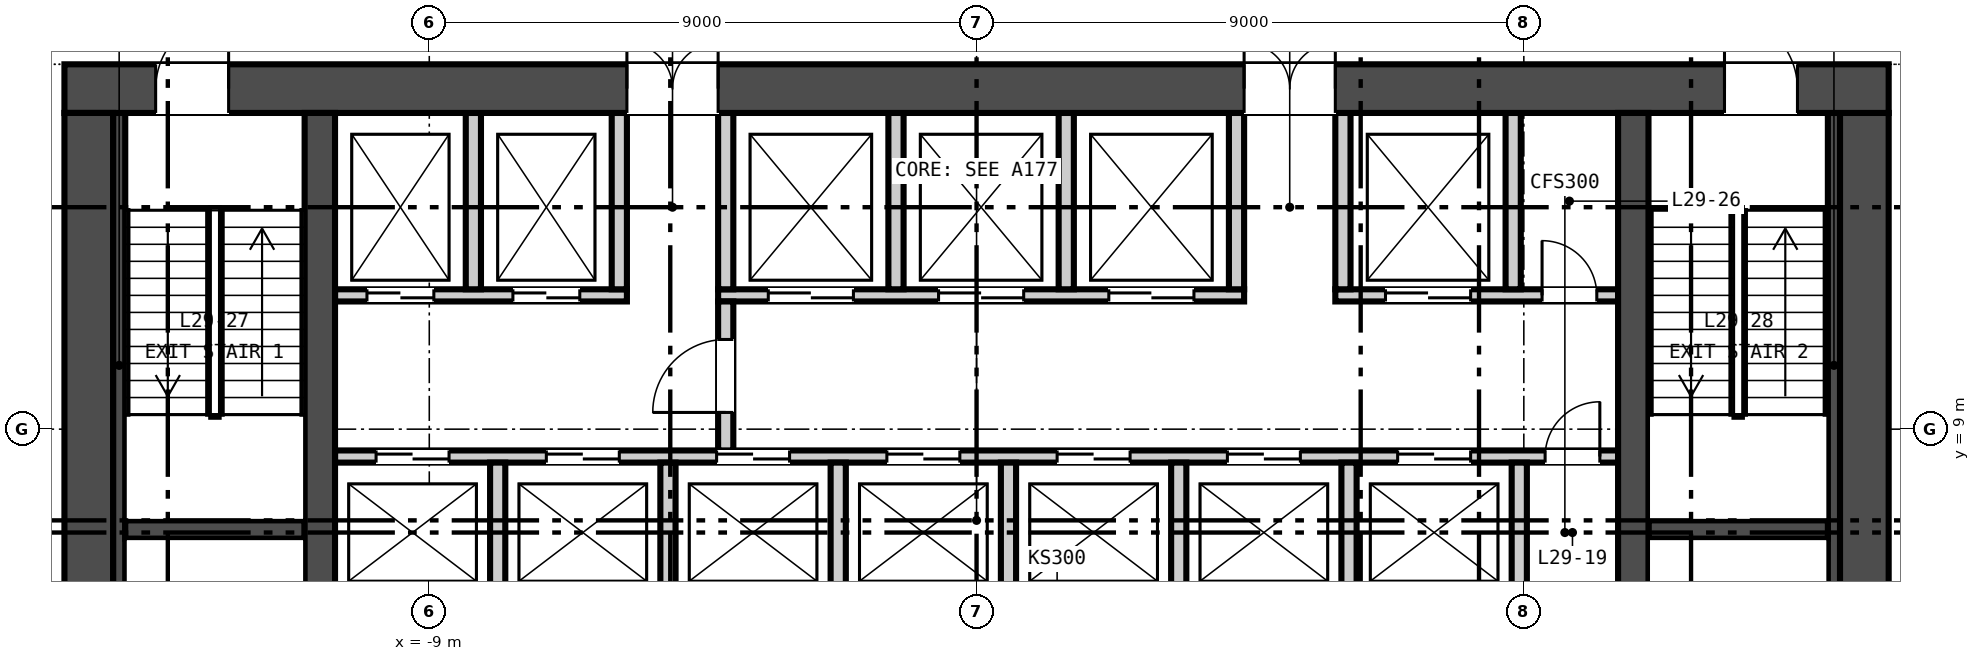
"""IFC4 building model, lengths in metres.
Left out: names, types, materials, properties, quantities, classifications, styles, units other than length and angle.
Written with IfcOpenShell. Run it as: python <this file> out.ifc"""

import sys

from ifc_helpers import new_model, si_unit, direction, frame, frame_2d, origin, place, context, subcontext, project, spatial, rectangle, extrude, element, fill, save


model = new_model("IFC4")
c1 = context("Model", 3, precision=1e-05, world=origin(), true_north=direction((0.0, 1.0)))
c2 = subcontext(c1, "Body", "Model", "MODEL_VIEW")
j1 = project(units=[si_unit("LENGTHUNIT", "METRE"), si_unit("PLANEANGLEUNIT", "RADIAN")], contexts=[c1])
p1 = place(None, origin())
s1 = spatial("IfcSite", under=j1, at=p1, CompositionType="ELEMENT")
p2 = place(p1, origin())
s2 = spatial("IfcBuilding", under=s1, at=p2, CompositionType="ELEMENT")
p3 = place(p2, frame((0.0, 0.0, 121.65)))
s3 = spatial("IfcBuildingStorey", under=s2, at=p3, CompositionType="ELEMENT", Elevation=121.65)
p4 = place(p3, frame((-15.0, 14.6, -0.3), z_axis=(0.0, 0.0, 1.0), x_axis=(1.0, 0.0, 0.0)))
e1 = element("IfcWall", 1, at=p4, inside=s3, PredefinedType="SOLIDWALL", context=c2, shape_type="SweptSolid", body=[
    extrude(rectangle(XDim=30.0, YDim=0.8, at=frame_2d((15.0, 0.0))), origin(), (0.0, 0.0, 1.0), 4.65),
])
p5 = place(p4, frame((9.25, 0.0, 0.3)))
e2 = element("IfcOpeningElement", 2, at=p5, cuts=e1, PredefinedType="OPENING", context=c2, shape_type="SweptSolid", body=[
    extrude(rectangle(XDim=1.5, YDim=2.1, at=frame_2d((0.75, 1.05))), frame((0.0, 0.41, 0.0), z_axis=(0.0, -1.0, 0.0), x_axis=(1.0, 0.0, 0.0)), (0.0, 0.0, 1.0), 0.82),
])
p6 = place(p4, frame((19.4, 0.0, 0.3)))
e3 = element("IfcOpeningElement", 3, at=p6, cuts=e1, PredefinedType="OPENING", context=c2, shape_type="SweptSolid", body=[
    extrude(rectangle(XDim=1.5, YDim=2.1, at=frame_2d((0.75, 1.05))), frame((0.0, 0.41, 0.0), z_axis=(0.0, -1.0, 0.0), x_axis=(1.0, 0.0, 0.0)), (0.0, 0.0, 1.0), 0.82),
])
p7 = place(p4, frame((1.5, 0.0, 0.3)))
e4 = element("IfcOpeningElement", 4, at=p7, cuts=e1, PredefinedType="OPENING", context=c2, shape_type="SweptSolid", body=[
    extrude(rectangle(XDim=1.2, YDim=2.1, at=frame_2d((0.6, 1.05))), frame((0.0, 0.41, 0.0), z_axis=(0.0, -1.0, 0.0), x_axis=(1.0, 0.0, 0.0)), (0.0, 0.0, 1.0), 0.82),
])
p8 = place(p4, frame((27.3, 0.0, 0.3)))
e5 = element("IfcOpeningElement", 5, at=p8, cuts=e1, PredefinedType="OPENING", context=c2, shape_type="SweptSolid", body=[
    extrude(rectangle(XDim=1.2, YDim=2.1, at=frame_2d((0.6, 1.05))), frame((0.0, 0.41, 0.0), z_axis=(0.0, -1.0, 0.0), x_axis=(1.0, 0.0, 0.0)), (0.0, 0.0, 1.0), 0.82),
])
for number, where, z_axis, x_axis in (
    (6, (-14.6, 0.8, -0.3), (0.0, 0.0, 1.0), (0.0, 1.0, 0.0)),
    (7, (14.6, 0.8, -0.3), (0.0, 0.0, 1.0), (0.0, 1.0, 0.0)),
):
    element("IfcWall", number, at=place(p3, frame(where, z_axis=z_axis, x_axis=x_axis)), inside=s3, PredefinedType="SOLIDWALL", context=c2, shape_type="SweptSolid", body=[
        extrude(rectangle(XDim=13.4, YDim=0.8, at=frame_2d((6.7, 0.0))), origin(), (0.0, 0.0, 1.0), 4.65),
    ])
for number, where, z_axis, x_axis in (
    (8, (-10.8, 0.8, -0.3), (0.0, 0.0, 1.0), (0.0, 1.0, 0.0)),
    (9, (10.8, 0.8, -0.3), (0.0, 0.0, 1.0), (0.0, 1.0, 0.0)),
):
    element("IfcWall", number, at=place(p3, frame(where, z_axis=z_axis, x_axis=x_axis)), inside=s3, PredefinedType="SOLIDWALL", context=c2, shape_type="SweptSolid", body=[
        extrude(rectangle(XDim=13.4, YDim=0.5, at=frame_2d((6.7, 0.0))), origin(), (0.0, 0.0, 1.0), 4.65),
    ])
p9 = place(p3, frame((-10.55, 8.55, 0.0), z_axis=(0.0, 0.0, 1.0), x_axis=(1.0, 0.0, 0.0)))
e10 = element("IfcWall", 10, at=p9, inside=s3, PredefinedType="PARTITIONING", context=c2, shape_type="SweptSolid", body=[
    extrude(rectangle(XDim=21.1, YDim=0.2, at=frame_2d((10.55, 0.0))), origin(), (0.0, 0.0, 1.0), 4.35),
])
p10 = place(p9, frame((0.675, 0.0, 0.0)))
e11 = element("IfcOpeningElement", 11, at=p10, cuts=e10, PredefinedType="OPENING", context=c2, shape_type="SweptSolid", body=[
    extrude(rectangle(XDim=1.2, YDim=2.1, at=frame_2d((0.6, 1.05))), frame((0.0, 0.11, 0.0), z_axis=(0.0, -1.0, 0.0), x_axis=(1.0, 0.0, 0.0)), (0.0, 0.0, 1.0), 0.22),
])
p11 = place(p9, frame((3.475, 0.0, 0.0)))
e12 = element("IfcOpeningElement", 12, at=p11, cuts=e10, PredefinedType="OPENING", context=c2, shape_type="SweptSolid", body=[
    extrude(rectangle(XDim=1.2, YDim=2.1, at=frame_2d((0.6, 1.05))), frame((0.0, 0.11, 0.0), z_axis=(0.0, -1.0, 0.0), x_axis=(1.0, 0.0, 0.0)), (0.0, 0.0, 1.0), 0.22),
])
p12 = place(p9, frame((6.275, 0.0, 0.0)))
e13 = element("IfcOpeningElement", 13, at=p12, cuts=e10, PredefinedType="OPENING", context=c2, shape_type="SweptSolid", body=[
    extrude(rectangle(XDim=1.2, YDim=2.1, at=frame_2d((0.6, 1.05))), frame((0.0, 0.11, 0.0), z_axis=(0.0, -1.0, 0.0), x_axis=(1.0, 0.0, 0.0)), (0.0, 0.0, 1.0), 0.22),
])
p13 = place(p9, frame((9.075, 0.0, 0.0)))
e14 = element("IfcOpeningElement", 14, at=p13, cuts=e10, PredefinedType="OPENING", context=c2, shape_type="SweptSolid", body=[
    extrude(rectangle(XDim=1.2, YDim=2.1, at=frame_2d((0.6, 1.05))), frame((0.0, 0.11, 0.0), z_axis=(0.0, -1.0, 0.0), x_axis=(1.0, 0.0, 0.0)), (0.0, 0.0, 1.0), 0.22),
])
p14 = place(p9, frame((11.875, 0.0, 0.0)))
e15 = element("IfcOpeningElement", 15, at=p14, cuts=e10, PredefinedType="OPENING", context=c2, shape_type="SweptSolid", body=[
    extrude(rectangle(XDim=1.2, YDim=2.1, at=frame_2d((0.6, 1.05))), frame((0.0, 0.11, 0.0), z_axis=(0.0, -1.0, 0.0), x_axis=(1.0, 0.0, 0.0)), (0.0, 0.0, 1.0), 0.22),
])
p15 = place(p9, frame((14.675, 0.0, 0.0)))
e16 = element("IfcOpeningElement", 16, at=p15, cuts=e10, PredefinedType="OPENING", context=c2, shape_type="SweptSolid", body=[
    extrude(rectangle(XDim=1.2, YDim=2.1, at=frame_2d((0.6, 1.05))), frame((0.0, 0.11, 0.0), z_axis=(0.0, -1.0, 0.0), x_axis=(1.0, 0.0, 0.0)), (0.0, 0.0, 1.0), 0.22),
])
p16 = place(p9, frame((17.475, 0.0, 0.0)))
e17 = element("IfcOpeningElement", 17, at=p16, cuts=e10, PredefinedType="OPENING", context=c2, shape_type="SweptSolid", body=[
    extrude(rectangle(XDim=1.2, YDim=2.1, at=frame_2d((0.6, 1.05))), frame((0.0, 0.11, 0.0), z_axis=(0.0, -1.0, 0.0), x_axis=(1.0, 0.0, 0.0)), (0.0, 0.0, 1.0), 0.22),
])
p17 = place(p9, frame((19.9, 0.0, 0.0)))
e18 = element("IfcOpeningElement", 18, at=p17, cuts=e10, PredefinedType="OPENING", context=c2, shape_type="SweptSolid", body=[
    extrude(rectangle(XDim=0.9, YDim=2.1, at=frame_2d((0.45, 1.05))), frame((0.0, 0.11, 0.0), z_axis=(0.0, -1.0, 0.0), x_axis=(1.0, 0.0, 0.0)), (0.0, 0.0, 1.0), 0.22),
])
p18 = place(p3, frame((-10.55, 11.2, 0.0), z_axis=(0.0, 0.0, 1.0), x_axis=(1.0, 0.0, 0.0)))
e19 = element("IfcWall", 19, at=p18, inside=s3, PredefinedType="PARTITIONING", context=c2, shape_type="SweptSolid", body=[
    extrude(rectangle(XDim=4.8, YDim=0.2, at=frame_2d((2.4, 0.0))), origin(), (0.0, 0.0, 1.0), 4.35),
])
p19 = place(p18, frame((0.525, 0.0, 0.0)))
e20 = element("IfcOpeningElement", 20, at=p19, cuts=e19, PredefinedType="OPENING", context=c2, shape_type="SweptSolid", body=[
    extrude(rectangle(XDim=1.1, YDim=2.1, at=frame_2d((0.55, 1.05))), frame((0.0, 0.11, 0.0), z_axis=(0.0, -1.0, 0.0), x_axis=(1.0, 0.0, 0.0)), (0.0, 0.0, 1.0), 0.22),
])
p20 = place(p18, frame((2.925, 0.0, 0.0)))
e21 = element("IfcOpeningElement", 21, at=p20, cuts=e19, PredefinedType="OPENING", context=c2, shape_type="SweptSolid", body=[
    extrude(rectangle(XDim=1.1, YDim=2.1, at=frame_2d((0.55, 1.05))), frame((0.0, 0.11, 0.0), z_axis=(0.0, -1.0, 0.0), x_axis=(1.0, 0.0, 0.0)), (0.0, 0.0, 1.0), 0.22),
])
p21 = place(p3, frame((-4.25, 11.2, 0.0), z_axis=(0.0, 0.0, 1.0), x_axis=(1.0, 0.0, 0.0)))
e22 = element("IfcWall", 22, at=p21, inside=s3, PredefinedType="PARTITIONING", context=c2, shape_type="SweptSolid", body=[
    extrude(rectangle(XDim=8.65, YDim=0.2, at=frame_2d((4.325, 0.0))), origin(), (0.0, 0.0, 1.0), 4.35),
])
p22 = place(p21, frame((0.825, 0.0, 0.0)))
e23 = element("IfcOpeningElement", 23, at=p22, cuts=e22, PredefinedType="OPENING", context=c2, shape_type="SweptSolid", body=[
    extrude(rectangle(XDim=1.4, YDim=2.1, at=frame_2d((0.7, 1.05))), frame((0.0, 0.11, 0.0), z_axis=(0.0, -1.0, 0.0), x_axis=(1.0, 0.0, 0.0)), (0.0, 0.0, 1.0), 0.22),
])
p23 = place(p21, frame((3.625, 0.0, 0.0)))
e24 = element("IfcOpeningElement", 24, at=p23, cuts=e22, PredefinedType="OPENING", context=c2, shape_type="SweptSolid", body=[
    extrude(rectangle(XDim=1.4, YDim=2.1, at=frame_2d((0.7, 1.05))), frame((0.0, 0.11, 0.0), z_axis=(0.0, -1.0, 0.0), x_axis=(1.0, 0.0, 0.0)), (0.0, 0.0, 1.0), 0.22),
])
p24 = place(p21, frame((6.425, 0.0, 0.0)))
e25 = element("IfcOpeningElement", 25, at=p24, cuts=e22, PredefinedType="OPENING", context=c2, shape_type="SweptSolid", body=[
    extrude(rectangle(XDim=1.4, YDim=2.1, at=frame_2d((0.7, 1.05))), frame((0.0, 0.11, 0.0), z_axis=(0.0, -1.0, 0.0), x_axis=(1.0, 0.0, 0.0)), (0.0, 0.0, 1.0), 0.22),
])
p25 = place(p3, frame((5.9, 11.2, 0.0), z_axis=(0.0, 0.0, 1.0), x_axis=(1.0, 0.0, 0.0)))
e26 = element("IfcWall", 26, at=p25, inside=s3, PredefinedType="PARTITIONING", context=c2, shape_type="SweptSolid", body=[
    extrude(rectangle(XDim=4.65, YDim=0.2, at=frame_2d((2.325, 0.0))), origin(), (0.0, 0.0, 1.0), 4.35),
])
p26 = place(p25, frame((0.825, 0.0, 0.0)))
e27 = element("IfcOpeningElement", 27, at=p26, cuts=e26, PredefinedType="OPENING", context=c2, shape_type="SweptSolid", body=[
    extrude(rectangle(XDim=1.4, YDim=2.1, at=frame_2d((0.7, 1.05))), frame((0.0, 0.11, 0.0), z_axis=(0.0, -1.0, 0.0), x_axis=(1.0, 0.0, 0.0)), (0.0, 0.0, 1.0), 0.22),
])
p27 = place(p25, frame((3.4, 0.0, 0.0)))
e28 = element("IfcOpeningElement", 28, at=p27, cuts=e26, PredefinedType="OPENING", context=c2, shape_type="SweptSolid", body=[
    extrude(rectangle(XDim=0.9, YDim=2.1, at=frame_2d((0.45, 1.05))), frame((0.0, 0.11, 0.0), z_axis=(0.0, -1.0, 0.0), x_axis=(1.0, 0.0, 0.0)), (0.0, 0.0, 1.0), 0.22),
])
p28 = place(p3, frame((-4.125, 8.65, 0.0), z_axis=(0.0, 0.0, 1.0), x_axis=(0.0, 1.0, 0.0)))
e29 = element("IfcWall", 29, at=p28, inside=s3, PredefinedType="PARTITIONING", context=c2, shape_type="SweptSolid", body=[
    extrude(rectangle(XDim=2.45, YDim=0.25, at=frame_2d((1.225, 0.0))), origin(), (0.0, 0.0, 1.0), 4.35),
])
p29 = place(p28, frame((0.625, 0.0, 0.0)))
e30 = element("IfcOpeningElement", 30, at=p29, cuts=e29, PredefinedType="OPENING", context=c2, shape_type="SweptSolid", body=[
    extrude(rectangle(XDim=1.2, YDim=2.1, at=frame_2d((0.6, 1.05))), frame((0.0, 0.135, 0.0), z_axis=(0.0, -1.0, 0.0), x_axis=(1.0, 0.0, 0.0)), (0.0, 0.0, 1.0), 0.27),
])
for number, where, z_axis, x_axis in (
    (31, (-7.875, 6.15, 0.0), (0.0, 0.0, 1.0), (0.0, 1.0, 0.0)),
    (32, (-5.075, 6.15, 0.0), (0.0, 0.0, 1.0), (0.0, 1.0, 0.0)),
    (33, (-2.275, 6.15, 0.0), (0.0, 0.0, 1.0), (0.0, 1.0, 0.0)),
    (34, (0.525, 6.15, 0.0), (0.0, 0.0, 1.0), (0.0, 1.0, 0.0)),
    (35, (3.325, 6.15, 0.0), (0.0, 0.0, 1.0), (0.0, 1.0, 0.0)),
    (36, (6.125, 6.15, 0.0), (0.0, 0.0, 1.0), (0.0, 1.0, 0.0)),
    (37, (8.925, 6.15, 0.0), (0.0, 0.0, 1.0), (0.0, 1.0, 0.0)),
):
    element("IfcWall", number, at=place(p3, frame(where, z_axis=z_axis, x_axis=x_axis)), inside=s3, PredefinedType="PARTITIONING", context=c2, shape_type="SweptSolid", body=[
        extrude(rectangle(XDim=2.3, YDim=0.25, at=frame_2d((1.15, 0.0))), origin(), (0.0, 0.0, 1.0), 4.35),
    ])
for number, where, z_axis, x_axis in (
    (38, (-8.275, 11.3, 0.0), (0.0, 0.0, 1.0), (0.0, 1.0, 0.0)),
    (39, (-5.875, 11.3, 0.0), (0.0, 0.0, 1.0), (0.0, 1.0, 0.0)),
    (40, (-4.125, 11.3, 0.0), (0.0, 0.0, 1.0), (0.0, 1.0, 0.0)),
    (41, (-1.325, 11.3, 0.0), (0.0, 0.0, 1.0), (0.0, 1.0, 0.0)),
    (42, (1.475, 11.3, 0.0), (0.0, 0.0, 1.0), (0.0, 1.0, 0.0)),
    (43, (4.275, 11.3, 0.0), (0.0, 0.0, 1.0), (0.0, 1.0, 0.0)),
    (44, (6.025, 11.3, 0.0), (0.0, 0.0, 1.0), (0.0, 1.0, 0.0)),
    (45, (8.825, 11.3, 0.0), (0.0, 0.0, 1.0), (0.0, 1.0, 0.0)),
):
    element("IfcWall", number, at=place(p3, frame(where, z_axis=z_axis, x_axis=x_axis)), inside=s3, PredefinedType="PARTITIONING", context=c2, shape_type="SweptSolid", body=[
        extrude(rectangle(XDim=2.9, YDim=0.25, at=frame_2d((1.45, 0.0))), origin(), (0.0, 0.0, 1.0), 4.35),
    ])
p30 = place(p3, frame((-14.0, 7.35, 0.0), z_axis=(0.0, 0.0, 1.0), x_axis=(1.0, 0.0, 0.0)))
e46 = element("IfcWall", 46, at=p30, inside=s3, PredefinedType="SOLIDWALL", context=c2, shape_type="SweptSolid", body=[
    extrude(rectangle(XDim=2.95, YDim=0.3, at=frame_2d((1.475, 0.0))), origin(), (0.0, 0.0, 1.0), 4.35),
])
p31 = place(p3, frame((-14.1, 0.8, 0.0), z_axis=(0.0, 0.0, 1.0), x_axis=(0.0, 1.0, 0.0)))
e47 = element("IfcWall", 47, at=p31, inside=s3, PredefinedType="SOLIDWALL", context=c2, shape_type="SweptSolid", body=[
    extrude(rectangle(XDim=13.4, YDim=0.2, at=frame_2d((6.7, 0.0))), origin(), (0.0, 0.0, 1.0), 4.35),
])
p32 = place(p3, frame((11.05, 7.35, 0.0), z_axis=(0.0, 0.0, 1.0), x_axis=(1.0, 0.0, 0.0)))
e48 = element("IfcWall", 48, at=p32, inside=s3, PredefinedType="SOLIDWALL", context=c2, shape_type="SweptSolid", body=[
    extrude(rectangle(XDim=2.95, YDim=0.3, at=frame_2d((1.475, 0.0))), origin(), (0.0, 0.0, 1.0), 4.35),
])
p33 = place(p3, frame((14.1, 0.8, 0.0), z_axis=(0.0, 0.0, 1.0), x_axis=(0.0, 1.0, 0.0)))
e49 = element("IfcWall", 49, at=p33, inside=s3, PredefinedType="SOLIDWALL", context=c2, shape_type="SweptSolid", body=[
    extrude(rectangle(XDim=13.4, YDim=0.2, at=frame_2d((6.7, 0.0))), origin(), (0.0, 0.0, 1.0), 4.35),
])
p34 = place(p29, origin())
e50 = element("IfcDoor", 50, at=p34, inside=s3, OperationType="SINGLE_SWING_LEFT", PredefinedType="DOOR", context=c2, shape_type="SweptSolid", body=[
    extrude(rectangle(XDim=1.2, YDim=2.1, at=frame_2d((0.6, 1.05))), frame((0.0, 0.025, 0.0), z_axis=(0.0, -1.0, 0.0), x_axis=(1.0, 0.0, 0.0)), (0.0, 0.0, 1.0), 0.05),
])
fill(e30, e50)
p35 = place(p10, origin())
e51 = element("IfcDoor", 51, at=p35, inside=s3, OperationType="DOUBLE_DOOR_SLIDING", PredefinedType="DOOR", context=c2, shape_type="SweptSolid", body=[
    extrude(rectangle(XDim=1.2, YDim=2.1, at=frame_2d((0.6, 1.05))), frame((0.0, 0.025, 0.0), z_axis=(0.0, -1.0, 0.0), x_axis=(1.0, 0.0, 0.0)), (0.0, 0.0, 1.0), 0.05),
])
fill(e11, e51)
p36 = place(p11, origin())
e52 = element("IfcDoor", 52, at=p36, inside=s3, OperationType="DOUBLE_DOOR_SLIDING", PredefinedType="DOOR", context=c2, shape_type="SweptSolid", body=[
    extrude(rectangle(XDim=1.2, YDim=2.1, at=frame_2d((0.6, 1.05))), frame((0.0, 0.025, 0.0), z_axis=(0.0, -1.0, 0.0), x_axis=(1.0, 0.0, 0.0)), (0.0, 0.0, 1.0), 0.05),
])
fill(e12, e52)
p37 = place(p12, origin())
e53 = element("IfcDoor", 53, at=p37, inside=s3, OperationType="DOUBLE_DOOR_SLIDING", PredefinedType="DOOR", context=c2, shape_type="SweptSolid", body=[
    extrude(rectangle(XDim=1.2, YDim=2.1, at=frame_2d((0.6, 1.05))), frame((0.0, 0.025, 0.0), z_axis=(0.0, -1.0, 0.0), x_axis=(1.0, 0.0, 0.0)), (0.0, 0.0, 1.0), 0.05),
])
fill(e13, e53)
p38 = place(p13, origin())
e54 = element("IfcDoor", 54, at=p38, inside=s3, OperationType="DOUBLE_DOOR_SLIDING", PredefinedType="DOOR", context=c2, shape_type="SweptSolid", body=[
    extrude(rectangle(XDim=1.2, YDim=2.1, at=frame_2d((0.6, 1.05))), frame((0.0, 0.025, 0.0), z_axis=(0.0, -1.0, 0.0), x_axis=(1.0, 0.0, 0.0)), (0.0, 0.0, 1.0), 0.05),
])
fill(e14, e54)
p39 = place(p14, origin())
e55 = element("IfcDoor", 55, at=p39, inside=s3, OperationType="DOUBLE_DOOR_SLIDING", PredefinedType="DOOR", context=c2, shape_type="SweptSolid", body=[
    extrude(rectangle(XDim=1.2, YDim=2.1, at=frame_2d((0.6, 1.05))), frame((0.0, 0.025, 0.0), z_axis=(0.0, -1.0, 0.0), x_axis=(1.0, 0.0, 0.0)), (0.0, 0.0, 1.0), 0.05),
])
fill(e15, e55)
p40 = place(p15, origin())
e56 = element("IfcDoor", 56, at=p40, inside=s3, OperationType="DOUBLE_DOOR_SLIDING", PredefinedType="DOOR", context=c2, shape_type="SweptSolid", body=[
    extrude(rectangle(XDim=1.2, YDim=2.1, at=frame_2d((0.6, 1.05))), frame((0.0, 0.025, 0.0), z_axis=(0.0, -1.0, 0.0), x_axis=(1.0, 0.0, 0.0)), (0.0, 0.0, 1.0), 0.05),
])
fill(e16, e56)
p41 = place(p16, origin())
e57 = element("IfcDoor", 57, at=p41, inside=s3, OperationType="DOUBLE_DOOR_SLIDING", PredefinedType="DOOR", context=c2, shape_type="SweptSolid", body=[
    extrude(rectangle(XDim=1.2, YDim=2.1, at=frame_2d((0.6, 1.05))), frame((0.0, 0.025, 0.0), z_axis=(0.0, -1.0, 0.0), x_axis=(1.0, 0.0, 0.0)), (0.0, 0.0, 1.0), 0.05),
])
fill(e17, e57)
p42 = place(p17, origin())
e58 = element("IfcDoor", 58, at=p42, inside=s3, OperationType="SINGLE_SWING_RIGHT", PredefinedType="DOOR", context=c2, shape_type="SweptSolid", body=[
    extrude(rectangle(XDim=0.9, YDim=2.1, at=frame_2d((0.45, 1.05))), frame((0.0, 0.025, 0.0), z_axis=(0.0, -1.0, 0.0), x_axis=(1.0, 0.0, 0.0)), (0.0, 0.0, 1.0), 0.05),
])
fill(e18, e58)
p43 = place(p19, origin())
e59 = element("IfcDoor", 59, at=p43, inside=s3, OperationType="DOUBLE_DOOR_SLIDING", PredefinedType="DOOR", context=c2, shape_type="SweptSolid", body=[
    extrude(rectangle(XDim=1.1, YDim=2.1, at=frame_2d((0.55, 1.05))), frame((0.0, 0.025, 0.0), z_axis=(0.0, -1.0, 0.0), x_axis=(1.0, 0.0, 0.0)), (0.0, 0.0, 1.0), 0.05),
])
fill(e20, e59)
p44 = place(p20, origin())
e60 = element("IfcDoor", 60, at=p44, inside=s3, OperationType="DOUBLE_DOOR_SLIDING", PredefinedType="DOOR", context=c2, shape_type="SweptSolid", body=[
    extrude(rectangle(XDim=1.1, YDim=2.1, at=frame_2d((0.55, 1.05))), frame((0.0, 0.025, 0.0), z_axis=(0.0, -1.0, 0.0), x_axis=(1.0, 0.0, 0.0)), (0.0, 0.0, 1.0), 0.05),
])
fill(e21, e60)
p45 = place(p22, origin())
e61 = element("IfcDoor", 61, at=p45, inside=s3, OperationType="DOUBLE_DOOR_SLIDING", PredefinedType="DOOR", context=c2, shape_type="SweptSolid", body=[
    extrude(rectangle(XDim=1.4, YDim=2.1, at=frame_2d((0.7, 1.05))), frame((0.0, 0.025, 0.0), z_axis=(0.0, -1.0, 0.0), x_axis=(1.0, 0.0, 0.0)), (0.0, 0.0, 1.0), 0.05),
])
fill(e23, e61)
p46 = place(p23, origin())
e62 = element("IfcDoor", 62, at=p46, inside=s3, OperationType="DOUBLE_DOOR_SLIDING", PredefinedType="DOOR", context=c2, shape_type="SweptSolid", body=[
    extrude(rectangle(XDim=1.4, YDim=2.1, at=frame_2d((0.7, 1.05))), frame((0.0, 0.025, 0.0), z_axis=(0.0, -1.0, 0.0), x_axis=(1.0, 0.0, 0.0)), (0.0, 0.0, 1.0), 0.05),
])
fill(e24, e62)
p47 = place(p24, origin())
e63 = element("IfcDoor", 63, at=p47, inside=s3, OperationType="DOUBLE_DOOR_SLIDING", PredefinedType="DOOR", context=c2, shape_type="SweptSolid", body=[
    extrude(rectangle(XDim=1.4, YDim=2.1, at=frame_2d((0.7, 1.05))), frame((0.0, 0.025, 0.0), z_axis=(0.0, -1.0, 0.0), x_axis=(1.0, 0.0, 0.0)), (0.0, 0.0, 1.0), 0.05),
])
fill(e25, e63)
p48 = place(p26, origin())
e64 = element("IfcDoor", 64, at=p48, inside=s3, OperationType="DOUBLE_DOOR_SLIDING", PredefinedType="DOOR", context=c2, shape_type="SweptSolid", body=[
    extrude(rectangle(XDim=1.4, YDim=2.1, at=frame_2d((0.7, 1.05))), frame((0.0, 0.025, 0.0), z_axis=(0.0, -1.0, 0.0), x_axis=(1.0, 0.0, 0.0)), (0.0, 0.0, 1.0), 0.05),
])
fill(e27, e64)
p49 = place(p27, origin())
e65 = element("IfcDoor", 65, at=p49, inside=s3, OperationType="SINGLE_SWING_LEFT", PredefinedType="DOOR", context=c2, shape_type="SweptSolid", body=[
    extrude(rectangle(XDim=0.9, YDim=2.1, at=frame_2d((0.45, 1.05))), frame((0.0, 0.025, 0.0), z_axis=(0.0, -1.0, 0.0), x_axis=(1.0, 0.0, 0.0)), (0.0, 0.0, 1.0), 0.05),
])
fill(e28, e65)
p50 = place(p5, origin())
e66 = element("IfcDoor", 66, at=p50, inside=s3, OperationType="DOUBLE_DOOR_SINGLE_SWING", PredefinedType="DOOR", context=c2, shape_type="SweptSolid", body=[
    extrude(rectangle(XDim=1.5, YDim=2.1, at=frame_2d((0.75, 1.05))), frame((0.0, 0.025, 0.0), z_axis=(0.0, -1.0, 0.0), x_axis=(1.0, 0.0, 0.0)), (0.0, 0.0, 1.0), 0.05),
])
fill(e2, e66)
p51 = place(p6, origin())
e67 = element("IfcDoor", 67, at=p51, inside=s3, OperationType="DOUBLE_DOOR_SINGLE_SWING", PredefinedType="DOOR", context=c2, shape_type="SweptSolid", body=[
    extrude(rectangle(XDim=1.5, YDim=2.1, at=frame_2d((0.75, 1.05))), frame((0.0, 0.025, 0.0), z_axis=(0.0, -1.0, 0.0), x_axis=(1.0, 0.0, 0.0)), (0.0, 0.0, 1.0), 0.05),
])
fill(e3, e67)
p52 = place(p7, origin())
e68 = element("IfcDoor", 68, at=p52, inside=s3, OperationType="SINGLE_SWING_RIGHT", PredefinedType="DOOR", context=c2, shape_type="SweptSolid", body=[
    extrude(rectangle(XDim=1.2, YDim=2.1, at=frame_2d((0.6, 1.05))), frame((0.0, 0.025, 0.0), z_axis=(0.0, -1.0, 0.0), x_axis=(1.0, 0.0, 0.0)), (0.0, 0.0, 1.0), 0.05),
])
fill(e4, e68)
p53 = place(p8, origin())
e69 = element("IfcDoor", 69, at=p53, inside=s3, OperationType="SINGLE_SWING_LEFT", PredefinedType="DOOR", context=c2, shape_type="SweptSolid", body=[
    extrude(rectangle(XDim=1.2, YDim=2.1, at=frame_2d((0.6, 1.05))), frame((0.0, 0.025, 0.0), z_axis=(0.0, -1.0, 0.0), x_axis=(1.0, 0.0, 0.0)), (0.0, 0.0, 1.0), 0.05),
])
fill(e5, e69)
save(model, sys.argv[1])
